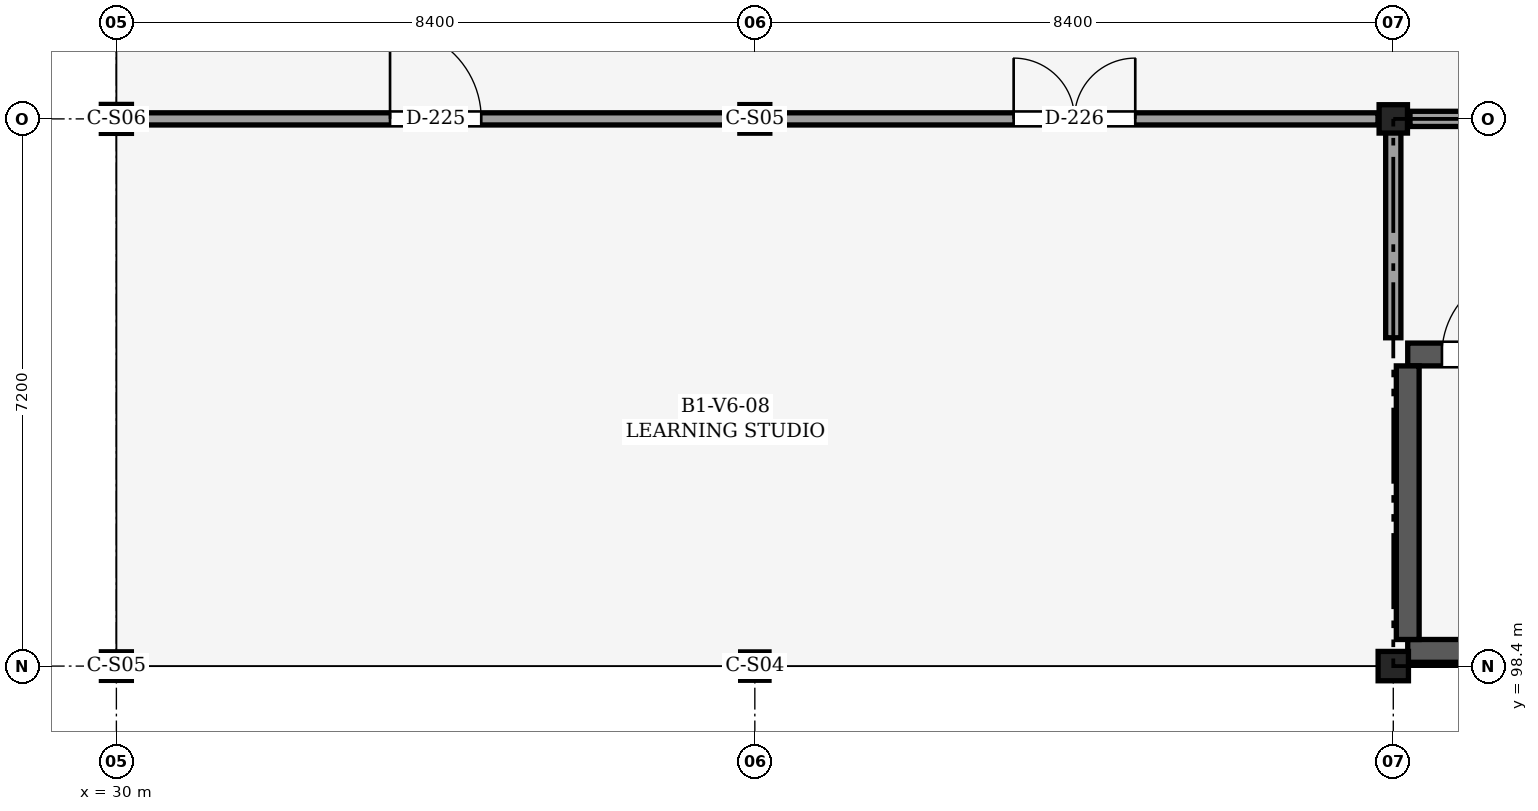
"""IFC4 building model, lengths in metres.
Left out: names, types, materials, properties, quantities, classifications, styles, units other than length and angle.
Written with IfcOpenShell. Run it as: python <this file> out.ifc"""

import sys

from ifc_helpers import new_model, si_unit, direction, frame, frame_2d, origin, origin_2d, place, context, subcontext, project, spatial, rectangle, i_section, extrude, element, fill, save


model = new_model("IFC4")
c1 = context("Model", 3, precision=1e-05, world=origin(), true_north=direction((0.0, 1.0)))
c2 = subcontext(c1, "Body", "Model", "MODEL_VIEW")
j1 = project(units=[si_unit("LENGTHUNIT", "METRE"), si_unit("PLANEANGLEUNIT", "RADIAN")], contexts=[c1])
p1 = place(None, origin())
s1 = spatial("IfcSite", under=j1, at=p1, CompositionType="ELEMENT")
p2 = place(p1, origin())
s2 = spatial("IfcBuilding", under=s1, at=p2, CompositionType="ELEMENT")
p3 = place(p2, frame((0.0, 0.0, -5.4)))
s3 = spatial("IfcBuildingStorey", under=s2, at=p3, CompositionType="ELEMENT", Elevation=-5.4)
p4 = place(p3, frame((30.0, 98.4, 0.0), z_axis=(0.0, 0.0, 1.0), x_axis=(1.0, 0.0, 0.0)))
e1 = element("IfcColumn", 1, at=p4, inside=s3, PredefinedType="COLUMN", context=c2, shape_type="SweptSolid", body=[
    extrude(i_section(OverallWidth=0.394, OverallDepth=0.376, WebThickness=0.017, FlangeThickness=0.028, FilletRadius=0.025, at=origin_2d()), origin(), (0.0, 0.0, 1.0), 5.4),
])
p5 = place(p3, frame((30.0, 105.6, 0.0), z_axis=(0.0, 0.0, 1.0), x_axis=(1.0, 0.0, 0.0)))
e2 = element("IfcColumn", 2, at=p5, inside=s3, PredefinedType="COLUMN", context=c2, shape_type="SweptSolid", body=[
    extrude(i_section(OverallWidth=0.396, OverallDepth=0.381, WebThickness=0.019, FlangeThickness=0.03, FilletRadius=0.025, at=origin_2d()), origin(), (0.0, 0.0, 1.0), 5.4),
])
p6 = place(p3, frame((38.4, 98.4, 0.0), z_axis=(0.0, 0.0, 1.0), x_axis=(1.0, 0.0, 0.0)))
e3 = element("IfcColumn", 3, at=p6, inside=s3, PredefinedType="COLUMN", context=c2, shape_type="SweptSolid", body=[
    extrude(i_section(OverallWidth=0.373, OverallDepth=0.373, WebThickness=0.016, FlangeThickness=0.026, FilletRadius=0.025, at=origin_2d()), origin(), (0.0, 0.0, 1.0), 5.4),
])
p7 = place(p3, frame((38.4, 105.6, 0.0), z_axis=(0.0, 0.0, 1.0), x_axis=(1.0, 0.0, 0.0)))
e4 = element("IfcColumn", 4, at=p7, inside=s3, PredefinedType="COLUMN", context=c2, shape_type="SweptSolid", body=[
    extrude(i_section(OverallWidth=0.394, OverallDepth=0.376, WebThickness=0.017, FlangeThickness=0.028, FilletRadius=0.025, at=origin_2d()), origin(), (0.0, 0.0, 1.0), 5.4),
])
p8 = place(p3, frame((46.8, 98.4, 0.0), z_axis=(0.0, 0.0, 1.0), x_axis=(1.0, 0.0, 0.0)))
e5 = element("IfcColumn", 5, at=p8, inside=s3, PredefinedType="COLUMN", context=c2, shape_type="SweptSolid", body=[
    extrude(i_section(OverallWidth=0.399, OverallDepth=0.386, WebThickness=0.021, FlangeThickness=0.033, FilletRadius=0.025, at=origin_2d()), origin(), (0.0, 0.0, 1.0), 5.4),
])
p9 = place(p3, frame((46.8, 105.6, 0.0), z_axis=(0.0, 0.0, 1.0), x_axis=(1.0, 0.0, 0.0)))
e6 = element("IfcColumn", 6, at=p9, inside=s3, PredefinedType="COLUMN", context=c2, shape_type="SweptSolid", body=[
    extrude(i_section(OverallWidth=0.373, OverallDepth=0.373, WebThickness=0.016, FlangeThickness=0.026, FilletRadius=0.025, at=origin_2d()), origin(), (0.0, 0.0, 1.0), 5.4),
])
p10 = place(p3, frame((46.99, 98.6, 0.0), z_axis=(0.0, 0.0, 1.0), x_axis=(1.0, 0.0, 0.0)))
e7 = element("IfcWall", 7, at=p10, inside=s3, PredefinedType="SHEAR", context=c2, shape_type="SweptSolid", body=[
    extrude(rectangle(XDim=8.02, YDim=0.3, at=frame_2d((4.01, 0.0))), origin(), (0.0, 0.0, 1.0), 5.12),
])
p11 = place(p3, frame((46.99, 102.5, 0.0), z_axis=(0.0, 0.0, 1.0), x_axis=(1.0, 0.0, 0.0)))
e8 = element("IfcWall", 8, at=p11, inside=s3, PredefinedType="SHEAR", context=c2, shape_type="SweptSolid", body=[
    extrude(rectangle(XDim=8.02, YDim=0.3, at=frame_2d((4.01, 0.0))), origin(), (0.0, 0.0, 1.0), 5.12),
])
p12 = place(p11, frame((0.45, 0.0, 0.0)))
e9 = element("IfcOpeningElement", 9, at=p12, cuts=e8, PredefinedType="OPENING", context=c2, shape_type="SweptSolid", body=[
    extrude(rectangle(XDim=1.1, YDim=2.15, at=frame_2d((0.55, 1.075))), frame((0.0, 0.16, 0.0), z_axis=(0.0, -1.0, 0.0), x_axis=(1.0, 0.0, 0.0)), (0.0, 0.0, 1.0), 0.321),
])
p13 = place(p3, frame((46.99, 98.75, 0.0), z_axis=(0.0, 0.0, 1.0), x_axis=(0.0, 1.0, 0.0)))
e10 = element("IfcWall", 10, at=p13, inside=s3, PredefinedType="SHEAR", context=c2, shape_type="SweptSolid", body=[
    extrude(rectangle(XDim=3.6, YDim=0.3, at=frame_2d((1.8, 0.0))), origin(), (0.0, 0.0, 1.0), 5.12),
])
p14 = place(p3, frame((46.8, 102.72, 0.0), z_axis=(0.0, 0.0, 1.0), x_axis=(0.0, 1.0, 0.0)))
e11 = element("IfcWall", 11, at=p14, inside=s3, PredefinedType="PARTITIONING", context=c2, shape_type="SweptSolid", body=[
    extrude(rectangle(XDim=2.86, YDim=0.2, at=frame_2d((1.43, 0.0))), origin(), (0.0, 0.0, 1.0), 4.488),
])
p15 = place(p3, frame((47.02, 105.6, 0.0), z_axis=(0.0, 0.0, 1.0), x_axis=(1.0, 0.0, 0.0)))
e12 = element("IfcWall", 12, at=p15, inside=s3, PredefinedType="PARTITIONING", context=c2, shape_type="SweptSolid", body=[
    extrude(rectangle(XDim=7.96, YDim=0.2, at=frame_2d((3.98, 0.0))), origin(), (0.0, 0.0, 1.0), 4.478),
])
p16 = place(p15, frame((3.255, 0.0, 0.0)))
e13 = element("IfcOpeningElement", 13, at=p16, cuts=e12, PredefinedType="OPENING", context=c2, shape_type="SweptSolid", body=[
    extrude(rectangle(XDim=1.45, YDim=2.2, at=frame_2d((0.725, 1.1))), frame((0.0, 0.11, 0.0), z_axis=(0.0, -1.0, 0.0), x_axis=(1.0, 0.0, 0.0)), (0.0, 0.0, 1.0), 0.22),
])
p17 = place(p3, frame((30.213, 105.6, 0.0), z_axis=(0.0, 0.0, 1.0), x_axis=(1.0, 0.0, 0.0)))
e14 = element("IfcWall", 14, at=p17, inside=s3, PredefinedType="PARTITIONING", context=c2, shape_type="SweptSolid", body=[
    extrude(rectangle(XDim=7.975, YDim=0.16, at=frame_2d((3.988, 0.0))), origin(), (0.0, 0.0, 1.0), 4.338),
])
p18 = place(p17, frame((3.387, 0.0, 0.0)))
e15 = element("IfcOpeningElement", 15, at=p18, cuts=e14, PredefinedType="OPENING", context=c2, shape_type="SweptSolid", body=[
    extrude(rectangle(XDim=1.2, YDim=2.2, at=frame_2d((0.6, 1.1))), frame((0.0, 0.09, 0.0), z_axis=(0.0, -1.0, 0.0), x_axis=(1.0, 0.0, 0.0)), (0.0, 0.0, 1.0), 0.18),
])
p19 = place(p3, frame((38.612, 105.6, 0.0), z_axis=(0.0, 0.0, 1.0), x_axis=(1.0, 0.0, 0.0)))
e16 = element("IfcWall", 16, at=p19, inside=s3, PredefinedType="PARTITIONING", context=c2, shape_type="SweptSolid", body=[
    extrude(rectangle(XDim=7.986, YDim=0.16, at=frame_2d((3.993, 0.0))), origin(), (0.0, 0.0, 1.0), 4.407),
])
p20 = place(p19, frame((3.193, 0.0, 0.0)))
e17 = element("IfcOpeningElement", 17, at=p20, cuts=e16, PredefinedType="OPENING", context=c2, shape_type="SweptSolid", body=[
    extrude(rectangle(XDim=1.6, YDim=2.35, at=frame_2d((0.8, 1.175))), frame((0.0, 0.09, 0.0), z_axis=(0.0, -1.0, 0.0), x_axis=(1.0, 0.0, 0.0)), (0.0, 0.0, 1.0), 0.18),
])
p21 = place(p12, origin())
e18 = element("IfcDoor", 18, at=p21, inside=s3, OperationType="SINGLE_SWING_RIGHT", PredefinedType="DOOR", context=c2, shape_type="SweptSolid", body=[
    extrude(rectangle(XDim=1.1, YDim=2.15, at=frame_2d((0.55, 1.075))), frame((0.0, 0.025, 0.0), z_axis=(0.0, -1.0, 0.0), x_axis=(1.0, 0.0, 0.0)), (0.0, 0.0, 1.0), 0.05),
])
fill(e9, e18)
p22 = place(p18, origin())
e19 = element("IfcDoor", 19, at=p22, inside=s3, OperationType="SINGLE_SWING_LEFT", PredefinedType="DOOR", context=c2, shape_type="SweptSolid", body=[
    extrude(rectangle(XDim=1.2, YDim=2.2, at=frame_2d((0.6, 1.1))), frame((0.0, 0.025, 0.0), z_axis=(0.0, -1.0, 0.0), x_axis=(1.0, 0.0, 0.0)), (0.0, 0.0, 1.0), 0.05),
])
fill(e15, e19)
p23 = place(p20, origin())
e20 = element("IfcDoor", 20, at=p23, inside=s3, OperationType="DOUBLE_DOOR_SINGLE_SWING", PredefinedType="DOOR", context=c2, shape_type="SweptSolid", body=[
    extrude(rectangle(XDim=1.6, YDim=2.35, at=frame_2d((0.8, 1.175))), frame((0.0, 0.025, 0.0), z_axis=(0.0, -1.0, 0.0), x_axis=(1.0, 0.0, 0.0)), (0.0, 0.0, 1.0), 0.05),
])
fill(e17, e20)
save(model, sys.argv[1])
